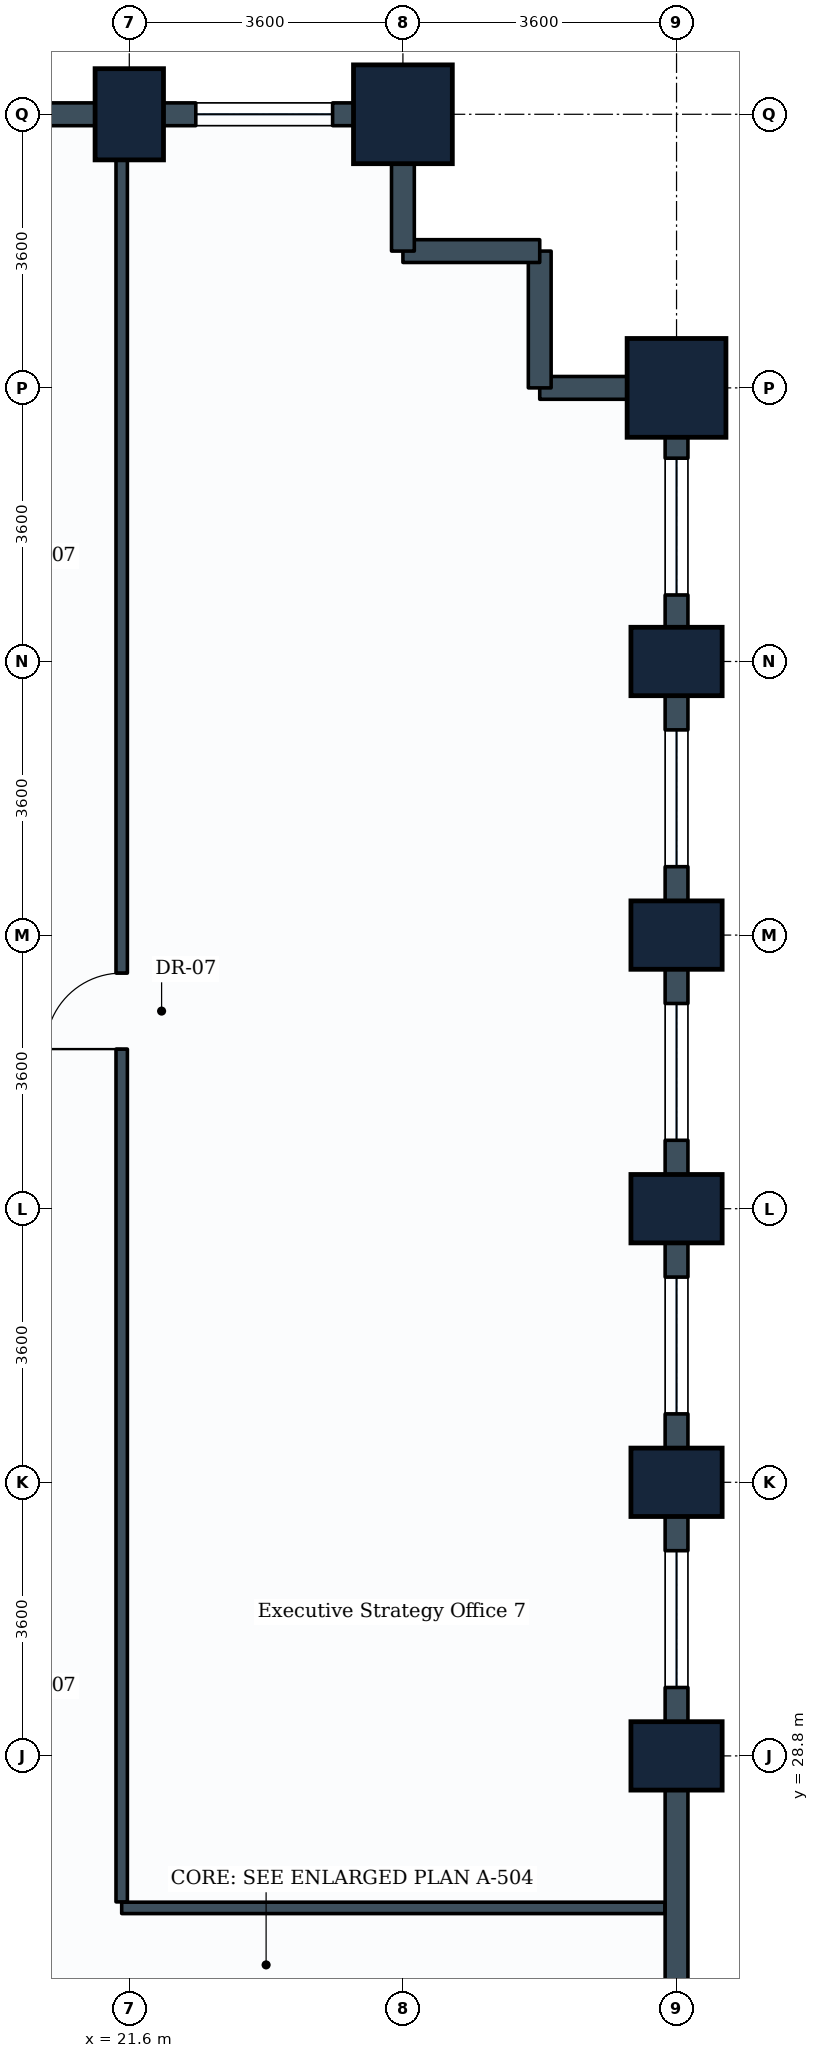
"""IFC4 building model, lengths in metres.
Left out: names, types, materials, properties, quantities, classifications, styles, units other than length and angle.
Written with IfcOpenShell. Run it as: python <this file> out.ifc"""

import sys

from ifc_helpers import new_model, si_unit, direction, frame, frame_2d, origin, origin_2d, place, context, subcontext, project, spatial, rectangle, extrude, element, fill, save


model = new_model("IFC4")
c1 = context("Model", 3, precision=1e-05, world=origin(), true_north=direction((0.0, 1.0)))
c2 = subcontext(c1, "Body", "Model", "MODEL_VIEW")
j1 = project(units=[si_unit("LENGTHUNIT", "METRE"), si_unit("PLANEANGLEUNIT", "RADIAN")], contexts=[c1])
p1 = place(None, origin())
s1 = spatial("IfcSite", under=j1, at=p1, CompositionType="ELEMENT")
p2 = place(p1, origin())
s2 = spatial("IfcBuilding", under=s1, at=p2, CompositionType="ELEMENT")
p3 = place(p2, frame((0.0, 0.0, 31.8)))
s3 = spatial("IfcBuildingStorey", under=s2, at=p3, CompositionType="ELEMENT", Elevation=31.8)
p4 = place(p3, frame((21.6, 50.4, 0.0), z_axis=(0.0, 0.0, 1.0), x_axis=(1.0, 0.0, 0.0)))
e1 = element("IfcColumn", 1, at=p4, inside=s3, PredefinedType="COLUMN", context=c2, shape_type="SweptSolid", body=[
    extrude(rectangle(XDim=0.9, YDim=1.2, at=origin_2d()), origin(), (0.0, 0.0, 1.0), 3.9),
])
p5 = place(p3, frame((25.2, 50.4, 0.0), z_axis=(0.0, 0.0, 1.0), x_axis=(1.0, 0.0, 0.0)))
e2 = element("IfcColumn", 2, at=p5, inside=s3, PredefinedType="COLUMN", context=c2, shape_type="SweptSolid", body=[
    extrude(rectangle(XDim=1.3, YDim=1.3, at=origin_2d()), origin(), (0.0, 0.0, 1.0), 3.9),
])
for number, where, z_axis, x_axis in (
    (3, (28.8, 28.8, 0.0), (0.0, 0.0, 1.0), (0.0, 1.0, 0.0)),
    (4, (28.8, 32.4, 0.0), (0.0, 0.0, 1.0), (0.0, 1.0, 0.0)),
    (5, (28.8, 36.0, 0.0), (0.0, 0.0, 1.0), (0.0, 1.0, 0.0)),
    (6, (28.8, 39.6, 0.0), (0.0, 0.0, 1.0), (0.0, 1.0, 0.0)),
    (7, (28.8, 43.2, 0.0), (0.0, 0.0, 1.0), (0.0, 1.0, 0.0)),
):
    element("IfcColumn", number, at=place(p3, frame(where, z_axis=z_axis, x_axis=x_axis)), inside=s3, PredefinedType="COLUMN", context=c2, shape_type="SweptSolid", body=[
        extrude(rectangle(XDim=0.9, YDim=1.2, at=origin_2d()), origin(), (0.0, 0.0, 1.0), 3.9),
    ])
p6 = place(p3, frame((28.8, 46.8, 0.0), z_axis=(0.0, 0.0, 1.0), x_axis=(0.0, 1.0, 0.0)))
e8 = element("IfcColumn", 8, at=p6, inside=s3, PredefinedType="COLUMN", context=c2, shape_type="SweptSolid", body=[
    extrude(rectangle(XDim=1.3, YDim=1.3, at=origin_2d()), origin(), (0.0, 0.0, 1.0), 3.9),
])
p7 = place(p3, frame((28.8, 25.2, 0.0), z_axis=(0.0, 0.0, 1.0), x_axis=(0.0, 1.0, 0.0)))
e9 = element("IfcWall", 9, at=p7, inside=s3, PredefinedType="STANDARD", context=c2, shape_type="SweptSolid", body=[
    extrude(rectangle(XDim=3.6, YDim=0.3, at=frame_2d((1.8, 0.0))), origin(), (0.0, 0.0, 1.0), 3.14),
])
p8 = place(p3, frame((28.8, 28.8, 0.0), z_axis=(0.0, 0.0, 1.0), x_axis=(0.0, 1.0, 0.0)))
e10 = element("IfcWall", 10, at=p8, inside=s3, PredefinedType="STANDARD", context=c2, shape_type="SweptSolid", body=[
    extrude(rectangle(XDim=3.6, YDim=0.3, at=frame_2d((1.8, 0.0))), origin(), (0.0, 0.0, 1.0), 2.93),
])
p9 = place(p8, frame((0.9, 0.0, 0.85)))
e11 = element("IfcOpeningElement", 11, at=p9, cuts=e10, PredefinedType="OPENING", context=c2, shape_type="SweptSolid", body=[
    extrude(rectangle(XDim=1.8, YDim=1.35, at=frame_2d((0.9, 0.675))), frame((0.0, 0.16, 0.0), z_axis=(0.0, -1.0, 0.0), x_axis=(1.0, 0.0, 0.0)), (0.0, 0.0, 1.0), 0.32),
])
p10 = place(p3, frame((28.8, 32.4, 0.0), z_axis=(0.0, 0.0, 1.0), x_axis=(0.0, 1.0, 0.0)))
e12 = element("IfcWall", 12, at=p10, inside=s3, PredefinedType="STANDARD", context=c2, shape_type="SweptSolid", body=[
    extrude(rectangle(XDim=3.6, YDim=0.3, at=frame_2d((1.8, 0.0))), origin(), (0.0, 0.0, 1.0), 2.93),
])
p11 = place(p10, frame((0.9, 0.0, 0.85)))
e13 = element("IfcOpeningElement", 13, at=p11, cuts=e12, PredefinedType="OPENING", context=c2, shape_type="SweptSolid", body=[
    extrude(rectangle(XDim=1.8, YDim=1.35, at=frame_2d((0.9, 0.675))), frame((0.0, 0.16, 0.0), z_axis=(0.0, -1.0, 0.0), x_axis=(1.0, 0.0, 0.0)), (0.0, 0.0, 1.0), 0.32),
])
p12 = place(p3, frame((28.8, 36.0, 0.0), z_axis=(0.0, 0.0, 1.0), x_axis=(0.0, 1.0, 0.0)))
e14 = element("IfcWall", 14, at=p12, inside=s3, PredefinedType="STANDARD", context=c2, shape_type="SweptSolid", body=[
    extrude(rectangle(XDim=3.6, YDim=0.3, at=frame_2d((1.8, 0.0))), origin(), (0.0, 0.0, 1.0), 2.93),
])
p13 = place(p12, frame((0.9, 0.0, 0.85)))
e15 = element("IfcOpeningElement", 15, at=p13, cuts=e14, PredefinedType="OPENING", context=c2, shape_type="SweptSolid", body=[
    extrude(rectangle(XDim=1.8, YDim=1.35, at=frame_2d((0.9, 0.675))), frame((0.0, 0.16, 0.0), z_axis=(0.0, -1.0, 0.0), x_axis=(1.0, 0.0, 0.0)), (0.0, 0.0, 1.0), 0.32),
])
p14 = place(p3, frame((28.8, 39.6, 0.0), z_axis=(0.0, 0.0, 1.0), x_axis=(0.0, 1.0, 0.0)))
e16 = element("IfcWall", 16, at=p14, inside=s3, PredefinedType="STANDARD", context=c2, shape_type="SweptSolid", body=[
    extrude(rectangle(XDim=3.6, YDim=0.3, at=frame_2d((1.8, 0.0))), origin(), (0.0, 0.0, 1.0), 2.93),
])
p15 = place(p14, frame((0.9, 0.0, 0.85)))
e17 = element("IfcOpeningElement", 17, at=p15, cuts=e16, PredefinedType="OPENING", context=c2, shape_type="SweptSolid", body=[
    extrude(rectangle(XDim=1.8, YDim=1.35, at=frame_2d((0.9, 0.675))), frame((0.0, 0.16, 0.0), z_axis=(0.0, -1.0, 0.0), x_axis=(1.0, 0.0, 0.0)), (0.0, 0.0, 1.0), 0.32),
])
p16 = place(p3, frame((28.8, 43.2, 0.0), z_axis=(0.0, 0.0, 1.0), x_axis=(0.0, 1.0, 0.0)))
e18 = element("IfcWall", 18, at=p16, inside=s3, PredefinedType="STANDARD", context=c2, shape_type="SweptSolid", body=[
    extrude(rectangle(XDim=3.6, YDim=0.3, at=frame_2d((1.8, 0.0))), origin(), (0.0, 0.0, 1.0), 2.93),
])
p17 = place(p16, frame((0.875, 0.0, 0.85)))
e19 = element("IfcOpeningElement", 19, at=p17, cuts=e18, PredefinedType="OPENING", context=c2, shape_type="SweptSolid", body=[
    extrude(rectangle(XDim=1.8, YDim=1.35, at=frame_2d((0.9, 0.675))), frame((0.0, 0.16, 0.0), z_axis=(0.0, -1.0, 0.0), x_axis=(1.0, 0.0, 0.0)), (0.0, 0.0, 1.0), 0.32),
])
p18 = place(p3, frame((27.0, 46.8, 0.0), z_axis=(0.0, 0.0, 1.0), x_axis=(1.0, 0.0, 0.0)))
e20 = element("IfcWall", 20, at=p18, inside=s3, PredefinedType="STANDARD", context=c2, shape_type="SweptSolid", body=[
    extrude(rectangle(XDim=1.8, YDim=0.3, at=frame_2d((0.9, 0.0))), origin(), (0.0, 0.0, 1.0), 2.93),
])
for number, where, z_axis, x_axis in (
    (21, (27.0, 46.8, 0.0), (0.0, 0.0, 1.0), (0.0, 1.0, 0.0)),
    (22, (25.2, 48.6, 0.0), (0.0, 0.0, 1.0), (1.0, 0.0, 0.0)),
):
    element("IfcWall", number, at=place(p3, frame(where, z_axis=z_axis, x_axis=x_axis)), inside=s3, PredefinedType="STANDARD", context=c2, shape_type="SweptSolid", body=[
        extrude(rectangle(XDim=1.8, YDim=0.3, at=frame_2d((0.9, 0.0))), origin(), (0.0, 0.0, 1.0), 3.635),
    ])
p19 = place(p3, frame((25.2, 48.6, 0.0), z_axis=(0.0, 0.0, 1.0), x_axis=(0.0, 1.0, 0.0)))
e23 = element("IfcWall", 23, at=p19, inside=s3, PredefinedType="STANDARD", context=c2, shape_type="SweptSolid", body=[
    extrude(rectangle(XDim=1.8, YDim=0.3, at=frame_2d((0.9, 0.0))), origin(), (0.0, 0.0, 1.0), 2.93),
])
p20 = place(p3, frame((21.6, 50.4, 0.0), z_axis=(0.0, 0.0, 1.0), x_axis=(1.0, 0.0, 0.0)))
e24 = element("IfcWall", 24, at=p20, inside=s3, PredefinedType="STANDARD", context=c2, shape_type="SweptSolid", body=[
    extrude(rectangle(XDim=3.6, YDim=0.3, at=frame_2d((1.8, 0.0))), origin(), (0.0, 0.0, 1.0), 2.93),
])
p21 = place(p20, frame((0.875, 0.0, 0.85)))
e25 = element("IfcOpeningElement", 25, at=p21, cuts=e24, PredefinedType="OPENING", context=c2, shape_type="SweptSolid", body=[
    extrude(rectangle(XDim=1.8, YDim=1.35, at=frame_2d((0.9, 0.675))), frame((0.0, 0.16, 0.0), z_axis=(0.0, -1.0, 0.0), x_axis=(1.0, 0.0, 0.0)), (0.0, 0.0, 1.0), 0.32),
])
p22 = place(p3, frame((18.0, 50.4, 0.0), z_axis=(0.0, 0.0, 1.0), x_axis=(1.0, 0.0, 0.0)))
e26 = element("IfcWall", 26, at=p22, inside=s3, PredefinedType="STANDARD", context=c2, shape_type="SweptSolid", body=[
    extrude(rectangle(XDim=3.6, YDim=0.3, at=frame_2d((1.8, 0.0))), origin(), (0.0, 0.0, 1.0), 2.93),
])
p23 = place(p3, frame((21.5, 26.8, 0.0), z_axis=(0.0, 0.0, 1.0), x_axis=(1.0, 0.0, 0.0)))
e27 = element("IfcWall", 27, at=p23, inside=s3, PredefinedType="PARTITIONING", context=c2, shape_type="SweptSolid", body=[
    extrude(rectangle(XDim=7.146, YDim=0.15, at=frame_2d((3.573, 0.0))), origin(), (0.0, 0.0, 1.0), 3.635),
])
p24 = place(p3, frame((21.5, 26.879, 0.0), z_axis=(0.0, 0.0, 1.0), x_axis=(0.0, 1.0, 0.0)))
e28 = element("IfcWall", 28, at=p24, inside=s3, PredefinedType="PARTITIONING", context=c2, shape_type="SweptSolid", body=[
    extrude(rectangle(XDim=23.367, YDim=0.15, at=frame_2d((11.684, 0.0))), origin(), (0.0, 0.0, 1.0), 2.93),
])
p25 = place(p24, frame((11.221, 0.0, 0.0)))
e29 = element("IfcOpeningElement", 29, at=p25, cuts=e28, PredefinedType="OPENING", context=c2, shape_type="SweptSolid", body=[
    extrude(rectangle(XDim=1.0, YDim=2.1, at=frame_2d((0.5, 1.05))), frame((0.0, 0.085, 0.0), z_axis=(0.0, -1.0, 0.0), x_axis=(1.0, 0.0, 0.0)), (0.0, 0.0, 1.0), 0.17),
])
p26 = place(p9, origin())
e30 = element("IfcWindow", 30, at=p26, inside=s3, PartitioningType="SINGLE_PANEL", PredefinedType="WINDOW", context=c2, shape_type="SweptSolid", body=[
    extrude(rectangle(XDim=1.8, YDim=1.35, at=frame_2d((0.9, 0.675))), frame((0.0, 0.03, 0.0), z_axis=(0.0, -1.0, 0.0), x_axis=(1.0, 0.0, 0.0)), (0.0, 0.0, 1.0), 0.06),
])
fill(e11, e30)
p27 = place(p11, origin())
e31 = element("IfcWindow", 31, at=p27, inside=s3, PartitioningType="SINGLE_PANEL", PredefinedType="WINDOW", context=c2, shape_type="SweptSolid", body=[
    extrude(rectangle(XDim=1.8, YDim=1.35, at=frame_2d((0.9, 0.675))), frame((0.0, 0.03, 0.0), z_axis=(0.0, -1.0, 0.0), x_axis=(1.0, 0.0, 0.0)), (0.0, 0.0, 1.0), 0.06),
])
fill(e13, e31)
p28 = place(p13, origin())
e32 = element("IfcWindow", 32, at=p28, inside=s3, PartitioningType="SINGLE_PANEL", PredefinedType="WINDOW", context=c2, shape_type="SweptSolid", body=[
    extrude(rectangle(XDim=1.8, YDim=1.35, at=frame_2d((0.9, 0.675))), frame((0.0, 0.03, 0.0), z_axis=(0.0, -1.0, 0.0), x_axis=(1.0, 0.0, 0.0)), (0.0, 0.0, 1.0), 0.06),
])
fill(e15, e32)
p29 = place(p15, origin())
e33 = element("IfcWindow", 33, at=p29, inside=s3, PartitioningType="SINGLE_PANEL", PredefinedType="WINDOW", context=c2, shape_type="SweptSolid", body=[
    extrude(rectangle(XDim=1.8, YDim=1.35, at=frame_2d((0.9, 0.675))), frame((0.0, 0.03, 0.0), z_axis=(0.0, -1.0, 0.0), x_axis=(1.0, 0.0, 0.0)), (0.0, 0.0, 1.0), 0.06),
])
fill(e17, e33)
p30 = place(p17, origin())
e34 = element("IfcWindow", 34, at=p30, inside=s3, PartitioningType="SINGLE_PANEL", PredefinedType="WINDOW", context=c2, shape_type="SweptSolid", body=[
    extrude(rectangle(XDim=1.8, YDim=1.35, at=frame_2d((0.9, 0.675))), frame((0.0, 0.03, 0.0), z_axis=(0.0, -1.0, 0.0), x_axis=(1.0, 0.0, 0.0)), (0.0, 0.0, 1.0), 0.06),
])
fill(e19, e34)
p31 = place(p21, origin())
e35 = element("IfcWindow", 35, at=p31, inside=s3, PartitioningType="SINGLE_PANEL", PredefinedType="WINDOW", context=c2, shape_type="SweptSolid", body=[
    extrude(rectangle(XDim=1.8, YDim=1.35, at=frame_2d((0.9, 0.675))), frame((0.0, 0.03, 0.0), z_axis=(0.0, -1.0, 0.0), x_axis=(1.0, 0.0, 0.0)), (0.0, 0.0, 1.0), 0.06),
])
fill(e25, e35)
p32 = place(p25, origin())
e36 = element("IfcDoor", 36, at=p32, inside=s3, OperationType="SINGLE_SWING_LEFT", PredefinedType="DOOR", context=c2, shape_type="SweptSolid", body=[
    extrude(rectangle(XDim=1.0, YDim=2.1, at=frame_2d((0.5, 1.05))), frame((0.0, 0.025, 0.0), z_axis=(0.0, -1.0, 0.0), x_axis=(1.0, 0.0, 0.0)), (0.0, 0.0, 1.0), 0.05),
])
fill(e29, e36)
save(model, sys.argv[1])
